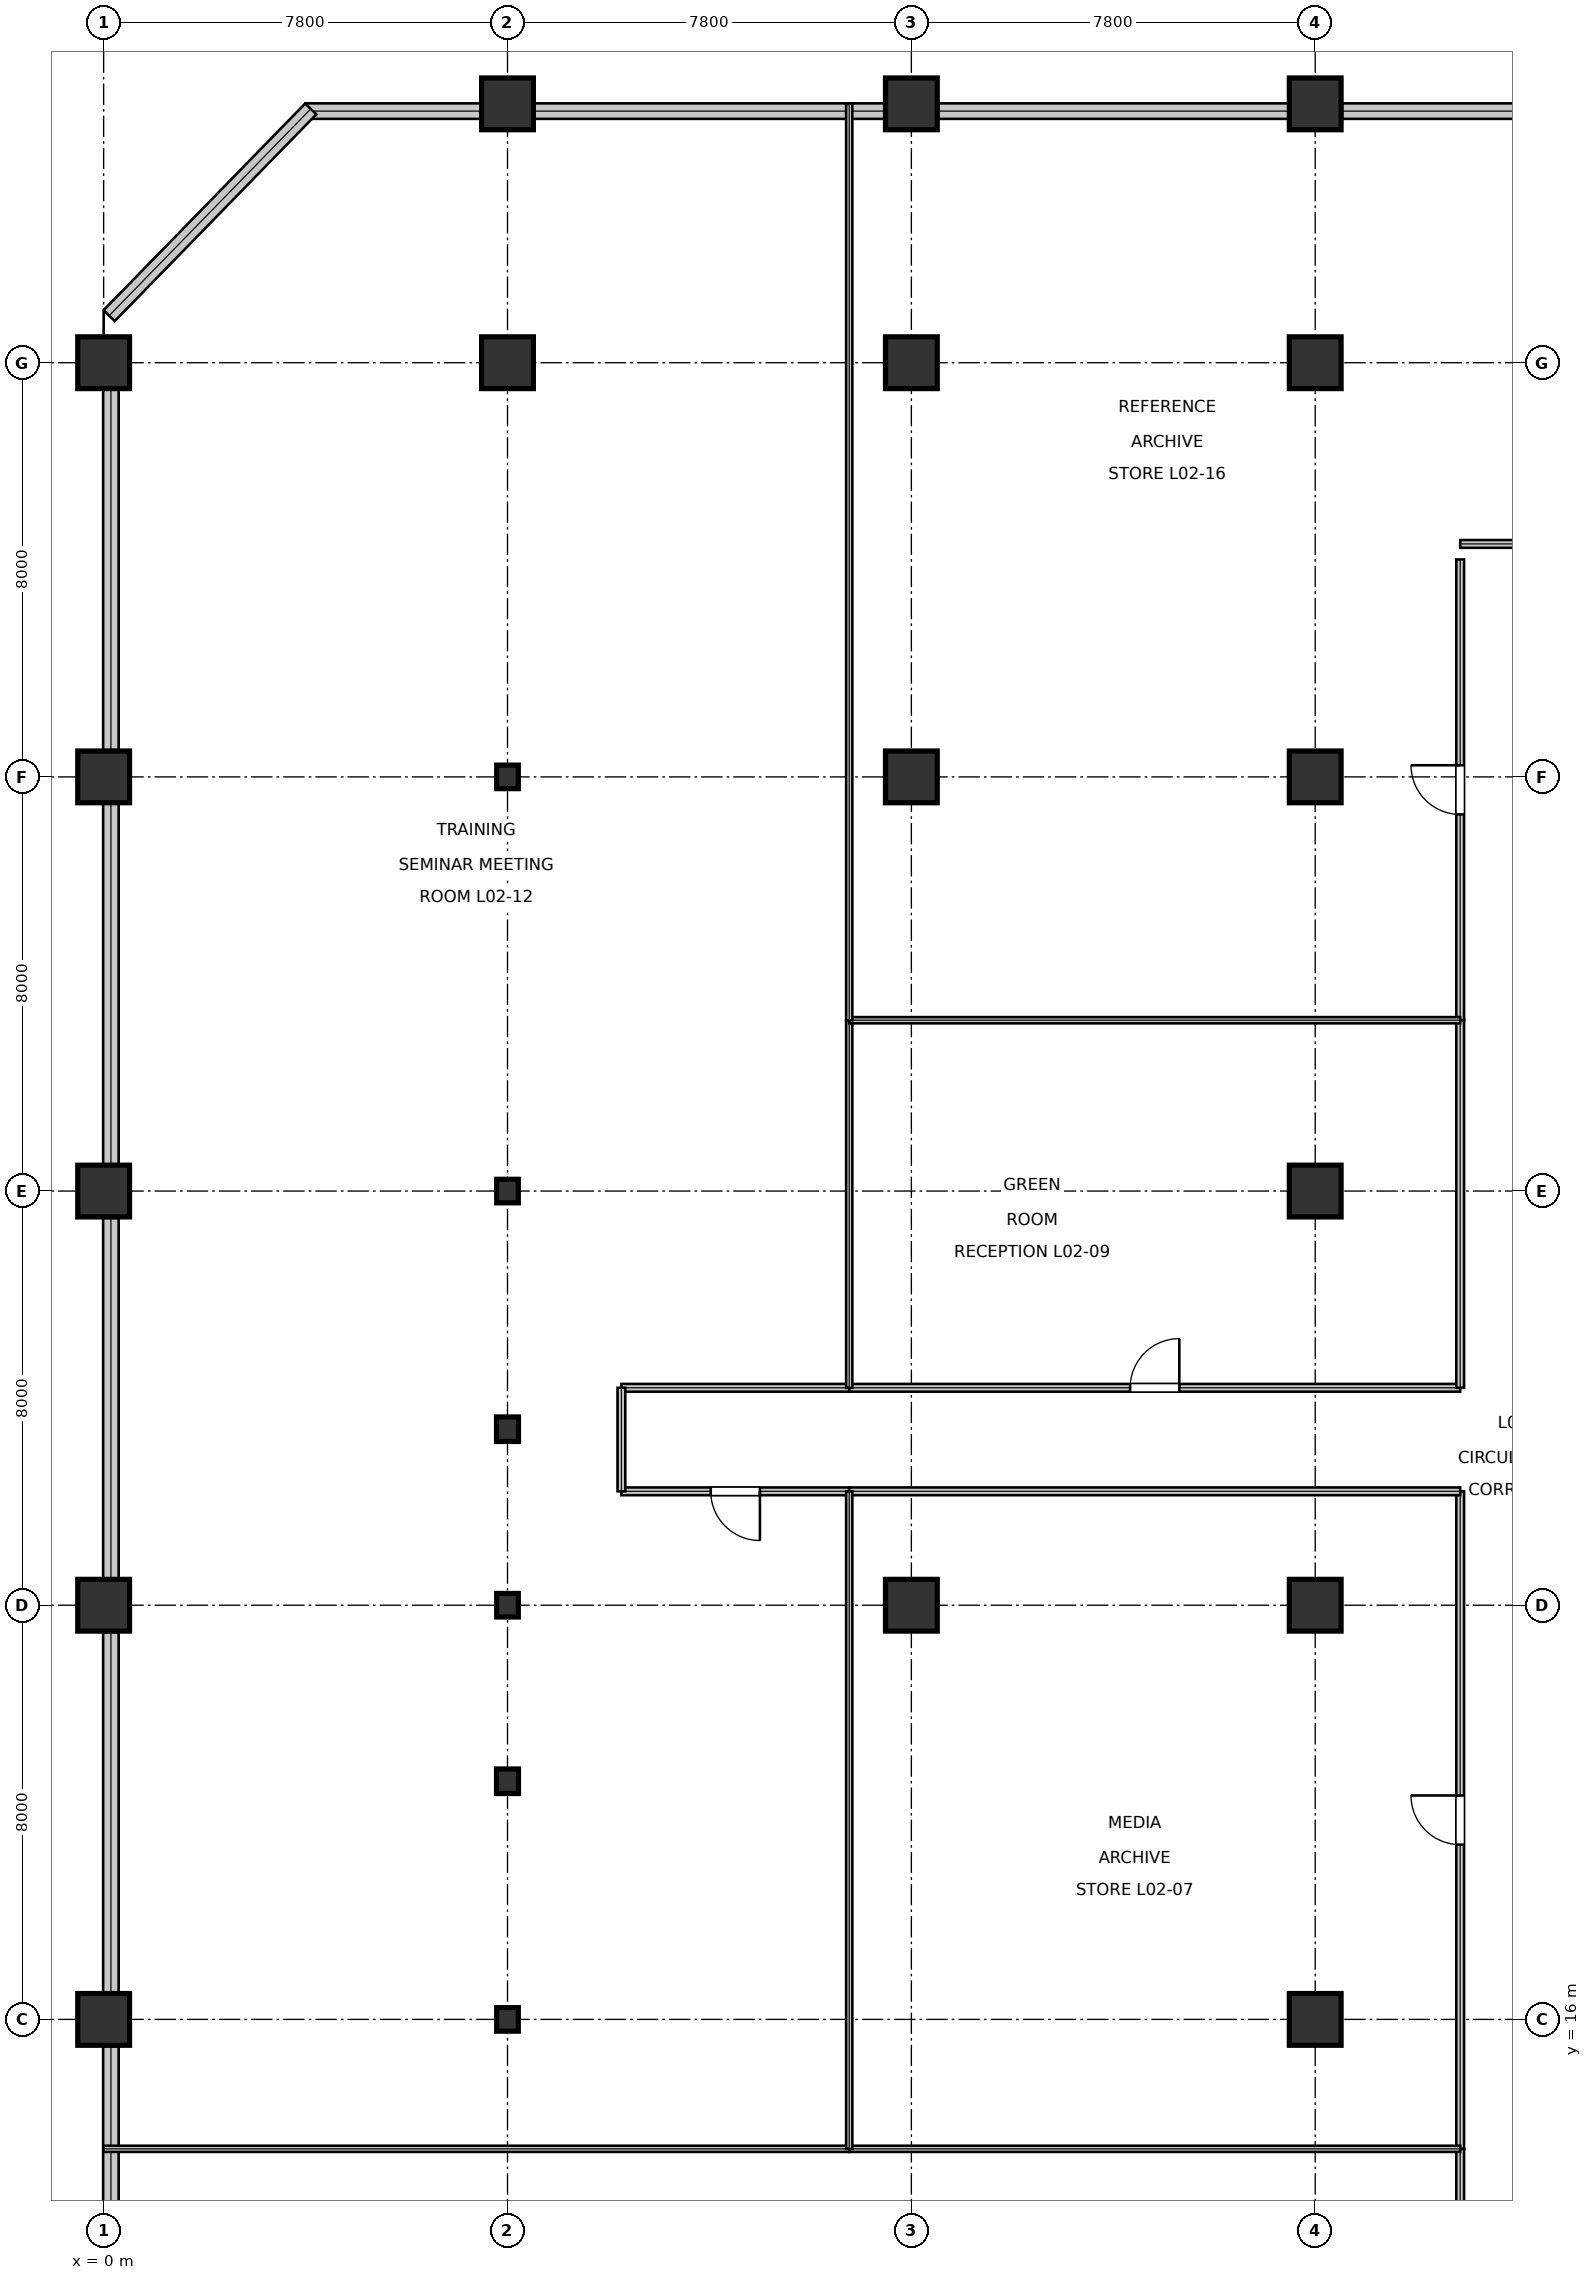
"""IFC4 building model, lengths in metres.
Left out: names, types, materials, properties, quantities, classifications, styles, units other than length and angle.
Written with IfcOpenShell. Run it as: python <this file> out.ifc"""

import sys

from ifc_helpers import new_model, si_unit, direction, frame, frame_2d, origin, origin_2d, place, context, subcontext, project, spatial, rectangle, i_section, extrude, element, fill, save


model = new_model("IFC4")
c1 = context("Model", 3, precision=1e-05, world=origin(), true_north=direction((0.0, 1.0)))
c2 = subcontext(c1, "Body", "Model", "MODEL_VIEW")
j1 = project(units=[si_unit("LENGTHUNIT", "METRE"), si_unit("PLANEANGLEUNIT", "RADIAN")], contexts=[c1])
p1 = place(None, origin())
s1 = spatial("IfcSite", under=j1, at=p1, CompositionType="ELEMENT")
p2 = place(p1, origin())
s2 = spatial("IfcBuilding", under=s1, at=p2, CompositionType="ELEMENT")
p3 = place(p2, frame((0.0, 0.0, 10.8)))
s3 = spatial("IfcBuildingStorey", under=s2, at=p3, CompositionType="ELEMENT", Elevation=10.8)
for number, where, z_axis, x_axis in (
    (1, (0.0, 16.0, 0.0), (0.0, 0.0, 1.0), (1.0, 0.0, 0.0)),
    (2, (0.0, 24.0, 0.0), (0.0, 0.0, 1.0), (1.0, 0.0, 0.0)),
    (3, (0.0, 32.0, 0.0), (0.0, 0.0, 1.0), (1.0, 0.0, 0.0)),
    (4, (0.0, 40.0, 0.0), (0.0, 0.0, 1.0), (1.0, 0.0, 0.0)),
    (5, (0.0, 48.0, 0.0), (0.0, 0.0, 1.0), (1.0, 0.0, 0.0)),
):
    element("IfcColumn", number, at=place(p3, frame(where, z_axis=z_axis, x_axis=x_axis)), inside=s3, PredefinedType="COLUMN", context=c2, shape_type="SweptSolid", body=[
        extrude(rectangle(XDim=1.0, YDim=1.0, at=origin_2d()), origin(), (0.0, 0.0, 1.0), 5.395),
    ])
for number, where, z_axis, x_axis in (
    (6, (7.8, 16.0, 0.0), (0.0, 0.0, 1.0), (1.0, 0.0, 0.0)),
    (7, (7.8, 24.0, 0.0), (0.0, 0.0, 1.0), (1.0, 0.0, 0.0)),
    (8, (7.8, 32.0, 0.0), (0.0, 0.0, 1.0), (1.0, 0.0, 0.0)),
    (9, (7.8, 40.0, 0.0), (0.0, 0.0, 1.0), (1.0, 0.0, 0.0)),
):
    element("IfcColumn", number, at=place(p3, frame(where, z_axis=z_axis, x_axis=x_axis)), inside=s3, PredefinedType="COLUMN", context=c2, shape_type="SweptSolid", body=[
        extrude(i_section(OverallWidth=0.418, OverallDepth=0.455, WebThickness=0.042, FlangeThickness=0.068, at=origin_2d()), origin(), (0.0, 0.0, 1.0), 5.395),
    ])
for number, where, z_axis, x_axis in (
    (10, (7.8, 48.0, 0.0), (0.0, 0.0, 1.0), (1.0, 0.0, 0.0)),
    (11, (7.8, 53.0, 0.0), (0.0, 0.0, 1.0), (1.0, 0.0, 0.0)),
    (12, (15.6, 24.0, 0.0), (0.0, 0.0, 1.0), (1.0, 0.0, 0.0)),
    (13, (15.6, 40.0, 0.0), (0.0, 0.0, 1.0), (1.0, 0.0, 0.0)),
    (14, (15.6, 48.0, 0.0), (0.0, 0.0, 1.0), (1.0, 0.0, 0.0)),
    (15, (15.6, 53.0, 0.0), (0.0, 0.0, 1.0), (1.0, 0.0, 0.0)),
    (16, (23.4, 16.0, 0.0), (0.0, 0.0, 1.0), (1.0, 0.0, 0.0)),
    (17, (23.4, 24.0, 0.0), (0.0, 0.0, 1.0), (1.0, 0.0, 0.0)),
    (18, (23.4, 32.0, 0.0), (0.0, 0.0, 1.0), (1.0, 0.0, 0.0)),
    (19, (23.4, 40.0, 0.0), (0.0, 0.0, 1.0), (1.0, 0.0, 0.0)),
    (20, (23.4, 48.0, 0.0), (0.0, 0.0, 1.0), (1.0, 0.0, 0.0)),
    (21, (23.4, 53.0, 0.0), (0.0, 0.0, 1.0), (1.0, 0.0, 0.0)),
):
    element("IfcColumn", number, at=place(p3, frame(where, z_axis=z_axis, x_axis=x_axis)), inside=s3, PredefinedType="COLUMN", context=c2, shape_type="SweptSolid", body=[
        extrude(rectangle(XDim=1.0, YDim=1.0, at=origin_2d()), origin(), (0.0, 0.0, 1.0), 5.395),
    ])
for number, where, z_axis, x_axis in (
    (22, (7.8, 20.6, 0.0), (0.0, 0.0, 1.0), (1.0, 0.0, 0.0)),
    (23, (7.8, 27.4, 0.0), (0.0, 0.0, 1.0), (1.0, 0.0, 0.0)),
):
    element("IfcColumn", number, at=place(p3, frame(where, z_axis=z_axis, x_axis=x_axis)), inside=s3, PredefinedType="COLUMN", context=c2, shape_type="SweptSolid", body=[
        extrude(i_section(OverallWidth=0.424, OverallDepth=0.474, WebThickness=0.048, FlangeThickness=0.077, at=origin_2d()), origin(), (0.0, 0.0, 1.0), 5.394),
    ])
p4 = place(p3, frame((30.682, 52.86, 0.0), z_axis=(0.0, 0.0, 1.0), x_axis=(-1.0, 0.0, 0.0)))
e24 = element("IfcWall", 24, at=p4, inside=s3, PredefinedType="STANDARD", context=c2, shape_type="SweptSolid", body=[
    extrude(rectangle(XDim=6.764, YDim=0.3, at=frame_2d((3.382, 0.0))), origin(), (0.0, 0.0, 1.0), 4.648),
])
p5 = place(p3, frame((22.882, 52.86, 0.0), z_axis=(0.0, 0.0, 1.0), x_axis=(-1.0, 0.0, 0.0)))
e25 = element("IfcWall", 25, at=p5, inside=s3, PredefinedType="STANDARD", context=c2, shape_type="SweptSolid", body=[
    extrude(rectangle(XDim=6.764, YDim=0.3, at=frame_2d((3.382, 0.0))), origin(), (0.0, 0.0, 1.0), 4.648),
])
p6 = place(p3, frame((15.082, 52.86, 0.0), z_axis=(0.0, 0.0, 1.0), x_axis=(-1.0, 0.0, 0.0)))
e26 = element("IfcWall", 26, at=p6, inside=s3, PredefinedType="STANDARD", context=c2, shape_type="SweptSolid", body=[
    extrude(rectangle(XDim=6.764, YDim=0.3, at=frame_2d((3.382, 0.0))), origin(), (0.0, 0.0, 1.0), 4.648),
])
p7 = place(p3, frame((7.282, 52.86, 0.0), z_axis=(0.0, 0.0, 1.0), x_axis=(-1.0, 0.0, 0.0)))
e27 = element("IfcWall", 27, at=p7, inside=s3, PredefinedType="STANDARD", context=c2, shape_type="SweptSolid", body=[
    extrude(rectangle(XDim=3.382, YDim=0.3, at=frame_2d((1.691, 0.0))), origin(), (0.0, 0.0, 1.0), 5.12),
])
p8 = place(p3, frame((4.0, 52.902, 0.0), z_axis=(0.0, 0.0, 1.0), x_axis=(-0.698099014162, -0.716001233536, 0.0)))
e28 = element("IfcWall", 28, at=p8, inside=s3, PredefinedType="STANDARD", context=c2, shape_type="SweptSolid", body=[
    extrude(rectangle(XDim=5.578, YDim=0.3, at=frame_2d((2.789, 0.0))), origin(), (0.0, 0.0, 1.0), 5.12),
])
for number, where, z_axis, x_axis in (
    (29, (0.14, 47.482, 0.0), (0.0, 0.0, 1.0), (0.0, -1.0, 0.0)),
    (30, (0.14, 39.482, 0.0), (0.0, 0.0, 1.0), (0.0, -1.0, 0.0)),
    (31, (0.14, 31.482, 0.0), (0.0, 0.0, 1.0), (0.0, -1.0, 0.0)),
    (32, (0.14, 23.482, 0.0), (0.0, 0.0, 1.0), (0.0, -1.0, 0.0)),
    (33, (0.14, 15.482, 0.0), (0.0, 0.0, 1.0), (0.0, -1.0, 0.0)),
):
    element("IfcWall", number, at=place(p3, frame(where, z_axis=z_axis, x_axis=x_axis)), inside=s3, PredefinedType="STANDARD", context=c2, shape_type="SweptSolid", body=[
        extrude(rectangle(XDim=6.964, YDim=0.3, at=frame_2d((3.482, 0.0))), origin(), (0.0, 0.0, 1.0), 4.648),
    ])
p9 = place(p3, frame((26.2, 2.5, 0.0), z_axis=(0.0, 0.0, 1.0), x_axis=(0.0, 1.0, 0.0)))
e34 = element("IfcWall", 34, at=p9, inside=s3, PredefinedType="PARTITIONING", context=c2, shape_type="SweptSolid", body=[
    extrude(rectangle(XDim=11.0, YDim=0.15, at=frame_2d((5.5, 0.0))), origin(), (0.0, 0.0, 1.0), 4.338),
])
p10 = place(p9, frame((5.025, 0.0, 0.0)))
e35 = element("IfcOpeningElement", 35, at=p10, cuts=e34, PredefinedType="OPENING", context=c2, shape_type="SweptSolid", body=[
    extrude(rectangle(XDim=0.95, YDim=2.15, at=frame_2d((0.475, 1.075))), frame((0.0, 0.085, 0.0), z_axis=(0.0, -1.0, 0.0), x_axis=(1.0, 0.0, 0.0)), (0.0, 0.0, 1.0), 0.17),
])
p11 = place(p3, frame((26.2, 13.5, 0.0), z_axis=(0.0, 0.0, 1.0), x_axis=(0.0, 1.0, 0.0)))
e36 = element("IfcWall", 36, at=p11, inside=s3, PredefinedType="PARTITIONING", context=c2, shape_type="SweptSolid", body=[
    extrude(rectangle(XDim=12.7, YDim=0.15, at=frame_2d((6.35, 0.0))), origin(), (0.0, 0.0, 1.0), 3.688),
])
p12 = place(p11, frame((5.875, 0.0, 0.0)))
e37 = element("IfcOpeningElement", 37, at=p12, cuts=e36, PredefinedType="OPENING", context=c2, shape_type="SweptSolid", body=[
    extrude(rectangle(XDim=0.95, YDim=2.15, at=frame_2d((0.475, 1.075))), frame((0.0, 0.085, 0.0), z_axis=(0.0, -1.0, 0.0), x_axis=(1.0, 0.0, 0.0)), (0.0, 0.0, 1.0), 0.17),
])
p13 = place(p3, frame((14.4, 28.2, 0.0), z_axis=(0.0, 0.0, 1.0), x_axis=(1.0, 0.0, 0.0)))
e38 = element("IfcWall", 38, at=p13, inside=s3, PredefinedType="PARTITIONING", context=c2, shape_type="SweptSolid", body=[
    extrude(rectangle(XDim=11.8, YDim=0.15, at=frame_2d((5.9, 0.0))), origin(), (0.0, 0.0, 1.0), 3.688),
])
p14 = place(p13, frame((5.425, 0.0, 0.0)))
e39 = element("IfcOpeningElement", 39, at=p14, cuts=e38, PredefinedType="OPENING", context=c2, shape_type="SweptSolid", body=[
    extrude(rectangle(XDim=0.95, YDim=2.15, at=frame_2d((0.475, 1.075))), frame((0.0, 0.085, 0.0), z_axis=(0.0, -1.0, 0.0), x_axis=(1.0, 0.0, 0.0)), (0.0, 0.0, 1.0), 0.17),
])
p15 = place(p3, frame((10.0, 26.2, 0.0), z_axis=(0.0, 0.0, 1.0), x_axis=(1.0, 0.0, 0.0)))
e40 = element("IfcWall", 40, at=p15, inside=s3, PredefinedType="PARTITIONING", context=c2, shape_type="SweptSolid", body=[
    extrude(rectangle(XDim=4.4, YDim=0.15, at=frame_2d((2.2, 0.0))), origin(), (0.0, 0.0, 1.0), 5.12),
])
p16 = place(p15, frame((1.725, 0.0, 0.0)))
e41 = element("IfcOpeningElement", 41, at=p16, cuts=e40, PredefinedType="OPENING", context=c2, shape_type="SweptSolid", body=[
    extrude(rectangle(XDim=0.95, YDim=2.15, at=frame_2d((0.475, 1.075))), frame((0.0, 0.085, 0.0), z_axis=(0.0, -1.0, 0.0), x_axis=(1.0, 0.0, 0.0)), (0.0, 0.0, 1.0), 0.17),
])
p17 = place(p3, frame((26.2, 35.3, 0.0), z_axis=(0.0, 0.0, 1.0), x_axis=(0.0, 1.0, 0.0)))
e42 = element("IfcWall", 42, at=p17, inside=s3, PredefinedType="PARTITIONING", context=c2, shape_type="SweptSolid", body=[
    extrude(rectangle(XDim=8.9, YDim=0.15, at=frame_2d((4.45, 0.0))), origin(), (0.0, 0.0, 1.0), 4.338),
])
p18 = place(p17, frame((3.975, 0.0, 0.0)))
e43 = element("IfcOpeningElement", 43, at=p18, cuts=e42, PredefinedType="OPENING", context=c2, shape_type="SweptSolid", body=[
    extrude(rectangle(XDim=0.95, YDim=2.15, at=frame_2d((0.475, 1.075))), frame((0.0, 0.085, 0.0), z_axis=(0.0, -1.0, 0.0), x_axis=(1.0, 0.0, 0.0)), (0.0, 0.0, 1.0), 0.17),
])
p19 = place(p3, frame((14.4, 26.2, 0.0), z_axis=(0.0, 0.0, 1.0), x_axis=(1.0, 0.0, 0.0)))
e44 = element("IfcWall", 44, at=p19, inside=s3, PredefinedType="PARTITIONING", context=c2, shape_type="SweptSolid", body=[
    extrude(rectangle(XDim=11.8, YDim=0.15, at=frame_2d((5.9, 0.0))), origin(), (0.0, 0.0, 1.0), 3.688),
])
p20 = place(p3, frame((26.2, 28.2, 0.0), z_axis=(0.0, 0.0, 1.0), x_axis=(0.0, 1.0, 0.0)))
e45 = element("IfcWall", 45, at=p20, inside=s3, PredefinedType="PARTITIONING", context=c2, shape_type="SweptSolid", body=[
    extrude(rectangle(XDim=7.1, YDim=0.15, at=frame_2d((3.55, 0.0))), origin(), (0.0, 0.0, 1.0), 4.338),
])
p21 = place(p3, frame((10.0, 28.2, 0.0), z_axis=(0.0, 0.0, 1.0), x_axis=(1.0, 0.0, 0.0)))
e46 = element("IfcWall", 46, at=p21, inside=s3, PredefinedType="PARTITIONING", context=c2, shape_type="SweptSolid", body=[
    extrude(rectangle(XDim=4.4, YDim=0.15, at=frame_2d((2.2, 0.0))), origin(), (0.0, 0.0, 1.0), 5.12),
])
p22 = place(p3, frame((10.0, 26.2, 0.0), z_axis=(0.0, 0.0, 1.0), x_axis=(0.0, 1.0, 0.0)))
e47 = element("IfcWall", 47, at=p22, inside=s3, PredefinedType="PARTITIONING", context=c2, shape_type="SweptSolid", body=[
    extrude(rectangle(XDim=2.0, YDim=0.15, at=frame_2d((1.0, 0.0))), origin(), (0.0, 0.0, 1.0), 5.12),
])
p23 = place(p3, frame((26.2, 44.5, 0.0), z_axis=(0.0, 0.0, 1.0), x_axis=(1.0, 0.0, 0.0)))
e48 = element("IfcWall", 48, at=p23, inside=s3, PredefinedType="PARTITIONING", context=c2, shape_type="SweptSolid", body=[
    extrude(rectangle(XDim=2.0, YDim=0.15, at=frame_2d((1.0, 0.0))), origin(), (0.0, 0.0, 1.0), 4.701),
])
p24 = place(p3, frame((14.4, 13.5, 0.0), z_axis=(0.0, 0.0, 1.0), x_axis=(1.0, 0.0, 0.0)))
e49 = element("IfcWall", 49, at=p24, inside=s3, PredefinedType="PARTITIONING", context=c2, shape_type="SweptSolid", body=[
    extrude(rectangle(XDim=11.8, YDim=0.12, at=frame_2d((5.9, 0.0))), origin(), (0.0, 0.0, 1.0), 3.688),
])
p25 = place(p3, frame((0.0, 13.5, 0.0), z_axis=(0.0, 0.0, 1.0), x_axis=(1.0, 0.0, 0.0)))
e50 = element("IfcWall", 50, at=p25, inside=s3, PredefinedType="PARTITIONING", context=c2, shape_type="SweptSolid", body=[
    extrude(rectangle(XDim=14.4, YDim=0.12, at=frame_2d((7.2, 0.0))), origin(), (0.0, 0.0, 1.0), 4.415),
])
p26 = place(p3, frame((14.4, 13.5, 0.0), z_axis=(0.0, 0.0, 1.0), x_axis=(0.0, 1.0, 0.0)))
e51 = element("IfcWall", 51, at=p26, inside=s3, PredefinedType="PARTITIONING", context=c2, shape_type="SweptSolid", body=[
    extrude(rectangle(XDim=12.7, YDim=0.12, at=frame_2d((6.35, 0.0))), origin(), (0.0, 0.0, 1.0), 3.688),
])
p27 = place(p3, frame((14.4, 28.2, 0.0), z_axis=(0.0, 0.0, 1.0), x_axis=(0.0, 1.0, 0.0)))
e52 = element("IfcWall", 52, at=p27, inside=s3, PredefinedType="PARTITIONING", context=c2, shape_type="SweptSolid", body=[
    extrude(rectangle(XDim=7.1, YDim=0.12, at=frame_2d((3.55, 0.0))), origin(), (0.0, 0.0, 1.0), 3.688),
])
p28 = place(p3, frame((14.4, 35.3, 0.0), z_axis=(0.0, 0.0, 1.0), x_axis=(1.0, 0.0, 0.0)))
e53 = element("IfcWall", 53, at=p28, inside=s3, PredefinedType="PARTITIONING", context=c2, shape_type="SweptSolid", body=[
    extrude(rectangle(XDim=11.8, YDim=0.12, at=frame_2d((5.9, 0.0))), origin(), (0.0, 0.0, 1.0), 3.688),
])
p29 = place(p3, frame((14.4, 35.3, 0.0), z_axis=(0.0, 0.0, 1.0), x_axis=(0.0, 1.0, 0.0)))
e54 = element("IfcWall", 54, at=p29, inside=s3, PredefinedType="PARTITIONING", context=c2, shape_type="SweptSolid", body=[
    extrude(rectangle(XDim=17.7, YDim=0.12, at=frame_2d((8.85, 0.0))), origin(), (0.0, 0.0, 1.0), 4.338),
])
p30 = place(p12, origin())
e55 = element("IfcDoor", 55, at=p30, inside=s3, OperationType="SINGLE_SWING_RIGHT", PredefinedType="DOOR", context=c2, shape_type="SweptSolid", body=[
    extrude(rectangle(XDim=0.95, YDim=2.15, at=frame_2d((0.475, 1.075))), frame((0.0, 0.025, 0.0), z_axis=(0.0, -1.0, 0.0), x_axis=(1.0, 0.0, 0.0)), (0.0, 0.0, 1.0), 0.05),
])
fill(e37, e55)
p31 = place(p14, origin())
e56 = element("IfcDoor", 56, at=p31, inside=s3, OperationType="SINGLE_SWING_RIGHT", PredefinedType="DOOR", context=c2, shape_type="SweptSolid", body=[
    extrude(rectangle(XDim=0.95, YDim=2.15, at=frame_2d((0.475, 1.075))), frame((0.0, 0.025, 0.0), z_axis=(0.0, -1.0, 0.0), x_axis=(1.0, 0.0, 0.0)), (0.0, 0.0, 1.0), 0.05),
])
fill(e39, e56)
p32 = place(p16, frame((0.95, 0.0, 0.0), z_axis=(0.0, 0.0, 1.0), x_axis=(-1.0, 0.0, 0.0)))
e57 = element("IfcDoor", 57, at=p32, inside=s3, OperationType="SINGLE_SWING_LEFT", PredefinedType="DOOR", context=c2, shape_type="SweptSolid", body=[
    extrude(rectangle(XDim=0.95, YDim=2.15, at=frame_2d((0.475, 1.075))), frame((0.0, 0.025, 0.0), z_axis=(0.0, -1.0, 0.0), x_axis=(1.0, 0.0, 0.0)), (0.0, 0.0, 1.0), 0.05),
])
fill(e41, e57)
p33 = place(p18, origin())
e58 = element("IfcDoor", 58, at=p33, inside=s3, OperationType="SINGLE_SWING_RIGHT", PredefinedType="DOOR", context=c2, shape_type="SweptSolid", body=[
    extrude(rectangle(XDim=0.95, YDim=2.15, at=frame_2d((0.475, 1.075))), frame((0.0, 0.025, 0.0), z_axis=(0.0, -1.0, 0.0), x_axis=(1.0, 0.0, 0.0)), (0.0, 0.0, 1.0), 0.05),
])
fill(e43, e58)
save(model, sys.argv[1])
